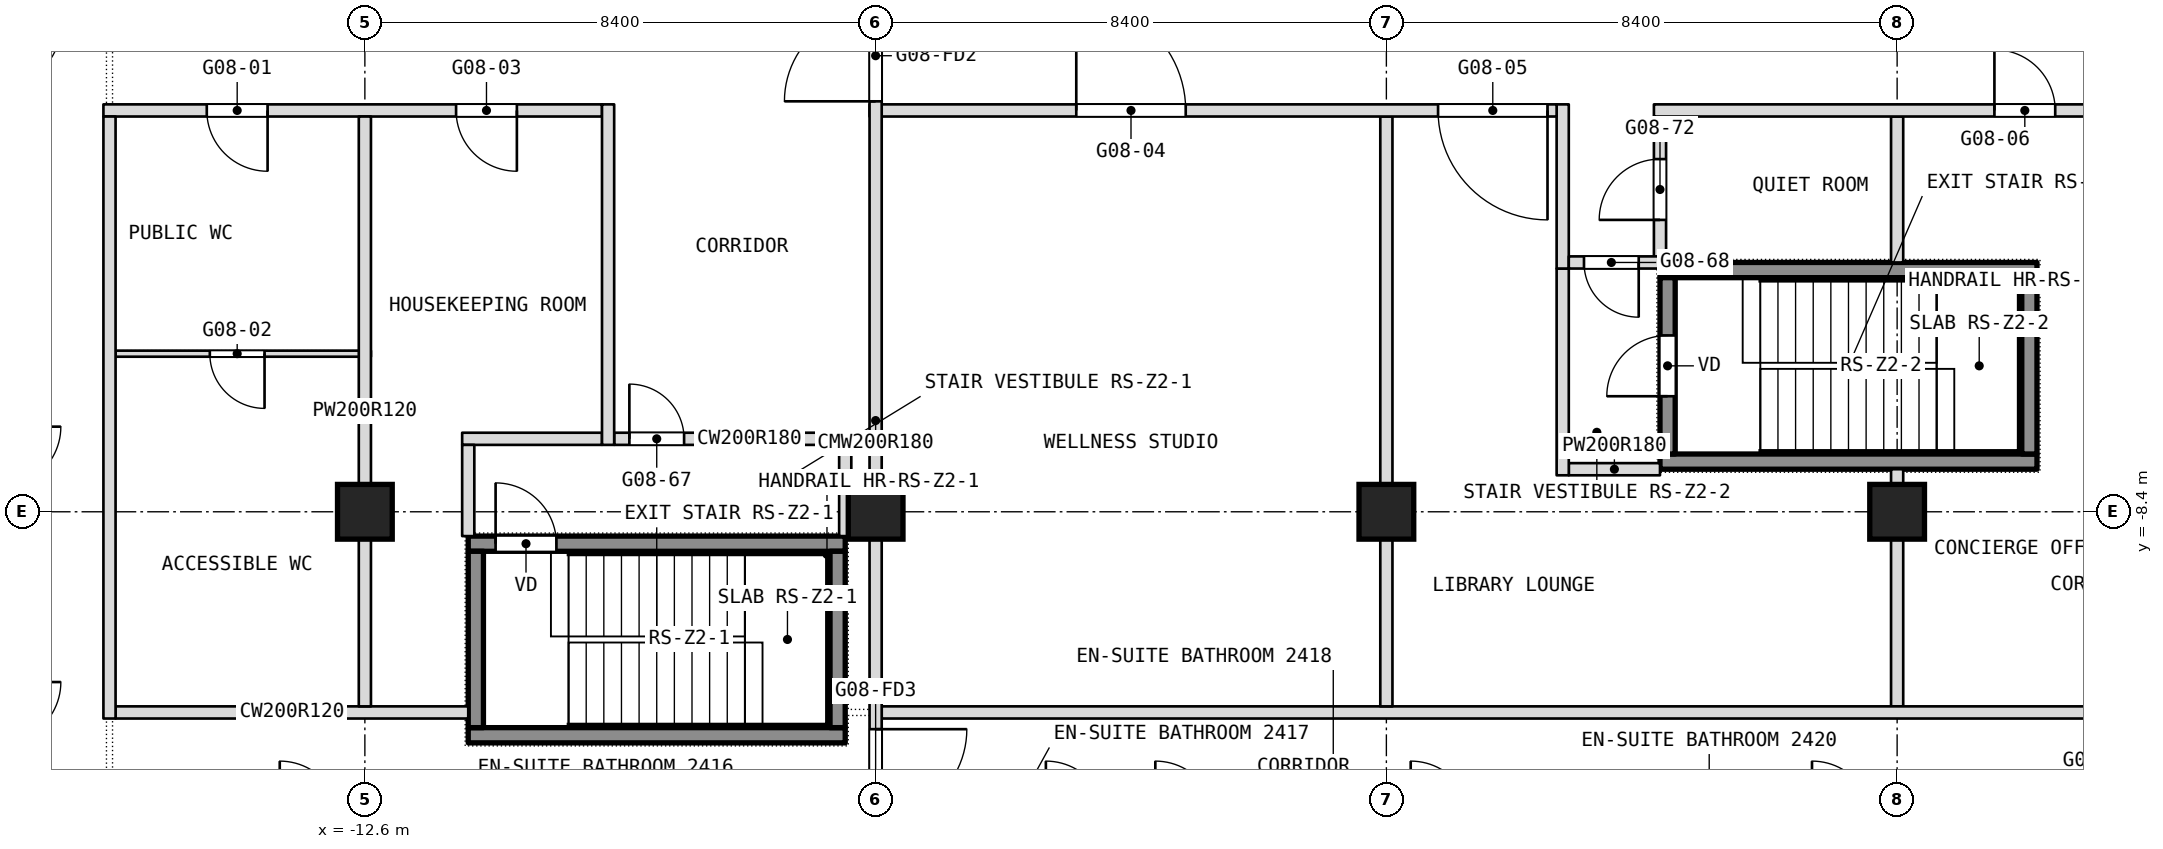
"""IFC4 building model, lengths in metres.
Left out: names, types, materials, properties, quantities, classifications, styles, units other than length and angle.
Written with IfcOpenShell. Run it as: python <this file> out.ifc"""

import sys

from ifc_helpers import new_model, si_unit, direction, frame, frame_2d, origin, origin_2d, place, context, subcontext, project, spatial, rectangle, extrude, element, fill, save


model = new_model("IFC4")
c1 = context("Model", 3, precision=1e-05, world=origin(), true_north=direction((0.0, 1.0)))
c2 = subcontext(c1, "Body", "Model", "MODEL_VIEW")
j1 = project(units=[si_unit("LENGTHUNIT", "METRE"), si_unit("PLANEANGLEUNIT", "RADIAN")], contexts=[c1])
p1 = place(None, origin())
s1 = spatial("IfcSite", under=j1, at=p1, CompositionType="ELEMENT")
p2 = place(p1, origin())
s2 = spatial("IfcBuilding", under=s1, at=p2, CompositionType="ELEMENT")
p3 = place(p2, frame((0.0, 0.0, 112.1)))
s3 = spatial("IfcBuildingStorey", under=s2, at=p3, CompositionType="ELEMENT", Elevation=112.1)
for number, where, z_axis, x_axis in (
    (1, (-12.6, -8.4, 0.0), (0.0, 0.0, 1.0), (1.0, 0.0, 0.0)),
    (2, (-4.2, -8.4, 0.0), (0.0, 0.0, 1.0), (1.0, 0.0, 0.0)),
    (3, (4.2, -8.4, 0.0), (0.0, 0.0, 1.0), (1.0, 0.0, 0.0)),
    (4, (12.6, -8.4, 0.0), (0.0, 0.0, 1.0), (1.0, 0.0, 0.0)),
):
    element("IfcColumn", number, at=place(p3, frame(where, z_axis=z_axis, x_axis=x_axis)), inside=s3, PredefinedType="COLUMN", context=c2, shape_type="SweptSolid", body=[
        extrude(rectangle(XDim=0.9, YDim=0.9, at=origin_2d()), origin(), (0.0, 0.0, 1.0), 3.6),
    ])
p4 = place(p3, frame((12.6, -11.6, 0.0), z_axis=(0.0, 0.0, 1.0), x_axis=(0.0, 1.0, 0.0)))
e5 = element("IfcWall", 5, at=p4, inside=s3, PredefinedType="PARTITIONING", context=c2, shape_type="SweptSolid", body=[
    extrude(rectangle(XDim=3.9, YDim=0.2, at=frame_2d((1.95, 0.0))), origin(), (0.0, 0.0, 1.0), 3.34),
])
p5 = place(p3, frame((12.6, -4.3, 0.0), z_axis=(0.0, 0.0, 1.0), x_axis=(0.0, 1.0, 0.0)))
e6 = element("IfcWall", 6, at=p5, inside=s3, PredefinedType="PARTITIONING", context=c2, shape_type="SweptSolid", body=[
    extrude(rectangle(XDim=2.4, YDim=0.2, at=frame_2d((1.2, 0.0))), origin(), (0.0, 0.0, 1.0), 3.34),
])
p6 = place(p3, frame((-16.7, -11.7, 0.0), z_axis=(0.0, 0.0, 1.0), x_axis=(1.0, 0.0, 0.0)))
e7 = element("IfcWall", 7, at=p6, inside=s3, PredefinedType="PARTITIONING", context=c2, shape_type="SweptSolid", body=[
    extrude(rectangle(XDim=5.8, YDim=0.2, at=frame_2d((2.9, 0.0))), origin(), (0.0, 0.0, 1.0), 3.34),
])
p7 = place(p3, frame((-4.1, -11.7, 0.0), z_axis=(0.0, 0.0, 1.0), x_axis=(1.0, 0.0, 0.0)))
e8 = element("IfcWall", 8, at=p7, inside=s3, PredefinedType="PARTITIONING", context=c2, shape_type="SweptSolid", body=[
    extrude(rectangle(XDim=20.8, YDim=0.2, at=frame_2d((10.4, 0.0))), origin(), (0.0, 0.0, 1.0), 3.34),
])
p8 = place(p3, frame((8.7, -4.3, 0.0), z_axis=(0.0, 0.0, 1.0), x_axis=(0.0, 1.0, 0.0)))
e9 = element("IfcWall", 9, at=p8, inside=s3, PredefinedType="PARTITIONING", context=c2, shape_type="SweptSolid", body=[
    extrude(rectangle(XDim=2.4, YDim=0.2, at=frame_2d((1.2, 0.0))), origin(), (0.0, 0.0, 1.0), 3.34),
])
p9 = place(p8, frame((0.7, 0.0, 0.0)))
e10 = element("IfcOpeningElement", 10, at=p9, cuts=e9, PredefinedType="OPENING", context=c2, shape_type="SweptSolid", body=[
    extrude(rectangle(XDim=1.0, YDim=2.1, at=frame_2d((0.5, 1.05))), frame((0.0, 0.1, 0.0), z_axis=(0.0, -1.0, 0.0), x_axis=(1.0, 0.0, 0.0)), (0.0, 0.0, 1.0), 0.2),
])
p10 = place(p3, frame((7.2, -7.7, 0.0), z_axis=(0.0, 0.0, 1.0), x_axis=(1.0, 0.0, 0.0)))
e11 = element("IfcWall", 11, at=p10, inside=s3, PredefinedType="PARTITIONING", context=c2, shape_type="SweptSolid", body=[
    extrude(rectangle(XDim=1.5, YDim=0.2, at=frame_2d((0.75, 0.0))), origin(), (0.0, 0.0, 1.0), 3.34),
])
p11 = place(p3, frame((-11.0, -7.2, 0.0), z_axis=(0.0, 0.0, 1.0), x_axis=(1.0, 0.0, 0.0)))
e12 = element("IfcWall", 12, at=p11, inside=s3, PredefinedType="PARTITIONING", context=c2, shape_type="SweptSolid", body=[
    extrude(rectangle(XDim=2.3, YDim=0.2, at=frame_2d((1.15, 0.0))), origin(), (0.0, 0.0, 1.0), 3.34),
])
p12 = place(p3, frame((-8.5, -7.2, 0.0), z_axis=(0.0, 0.0, 1.0), x_axis=(1.0, 0.0, 0.0)))
e13 = element("IfcWall", 13, at=p12, inside=s3, PredefinedType="PARTITIONING", context=c2, shape_type="SweptSolid", body=[
    extrude(rectangle(XDim=3.7, YDim=0.2, at=frame_2d((1.85, 0.0))), origin(), (0.0, 0.0, 1.0), 3.34),
])
p13 = place(p12, frame((0.25, 0.0, 0.0)))
e14 = element("IfcOpeningElement", 14, at=p13, cuts=e13, PredefinedType="OPENING", context=c2, shape_type="SweptSolid", body=[
    extrude(rectangle(XDim=0.9, YDim=2.1, at=frame_2d((0.45, 1.05))), frame((0.0, 0.1, 0.0), z_axis=(0.0, -1.0, 0.0), x_axis=(1.0, 0.0, 0.0)), (0.0, 0.0, 1.0), 0.2),
])
p14 = place(p3, frame((7.1, -7.8, 0.0), z_axis=(0.0, 0.0, 1.0), x_axis=(0.0, 1.0, 0.0)))
e15 = element("IfcWall", 15, at=p14, inside=s3, PredefinedType="PARTITIONING", context=c2, shape_type="SweptSolid", body=[
    extrude(rectangle(XDim=3.4, YDim=0.2, at=frame_2d((1.7, 0.0))), origin(), (0.0, 0.0, 1.0), 3.34),
])
p15 = place(p3, frame((7.1, -4.4, 0.0), z_axis=(0.0, 0.0, 1.0), x_axis=(0.0, 1.0, 0.0)))
e16 = element("IfcWall", 16, at=p15, inside=s3, PredefinedType="PARTITIONING", context=c2, shape_type="SweptSolid", body=[
    extrude(rectangle(XDim=2.7, YDim=0.2, at=frame_2d((1.35, 0.0))), origin(), (0.0, 0.0, 1.0), 3.34),
])
p16 = place(p3, frame((-16.7, -5.8, 0.0), z_axis=(0.0, 0.0, 1.0), x_axis=(1.0, 0.0, 0.0)))
e17 = element("IfcWall", 17, at=p16, inside=s3, PredefinedType="PARTITIONING", context=c2, shape_type="SweptSolid", body=[
    extrude(rectangle(XDim=4.2, YDim=0.1, at=frame_2d((2.1, 0.0))), origin(), (0.0, 0.0, 1.0), 3.34),
])
p17 = place(p16, frame((1.55, 0.0, 0.0)))
e18 = element("IfcOpeningElement", 18, at=p17, cuts=e17, PredefinedType="OPENING", context=c2, shape_type="SweptSolid", body=[
    extrude(rectangle(XDim=0.9, YDim=2.1, at=frame_2d((0.45, 1.05))), frame((0.0, 0.05, 0.0), z_axis=(0.0, -1.0, 0.0), x_axis=(1.0, 0.0, 0.0)), (0.0, 0.0, 1.0), 0.1),
])
p18 = place(p3, frame((7.2, -4.3, 0.0), z_axis=(0.0, 0.0, 1.0), x_axis=(1.0, 0.0, 0.0)))
e19 = element("IfcWall", 19, at=p18, inside=s3, PredefinedType="PARTITIONING", context=c2, shape_type="SweptSolid", body=[
    extrude(rectangle(XDim=1.5, YDim=0.2, at=frame_2d((0.75, 0.0))), origin(), (0.0, 0.0, 1.0), 3.34),
])
p19 = place(p18, frame((0.25, 0.0, 0.0)))
e20 = element("IfcOpeningElement", 20, at=p19, cuts=e19, PredefinedType="OPENING", context=c2, shape_type="SweptSolid", body=[
    extrude(rectangle(XDim=0.9, YDim=2.1, at=frame_2d((0.45, 1.05))), frame((0.0, 0.1, 0.0), z_axis=(0.0, -1.0, 0.0), x_axis=(1.0, 0.0, 0.0)), (0.0, 0.0, 1.0), 0.2),
])
p20 = place(p3, frame((4.2, -11.6, 0.0), z_axis=(0.0, 0.0, 1.0), x_axis=(0.0, 1.0, 0.0)))
e21 = element("IfcWall", 21, at=p20, inside=s3, PredefinedType="PARTITIONING", context=c2, shape_type="SweptSolid", body=[
    extrude(rectangle(XDim=9.7, YDim=0.2, at=frame_2d((4.85, 0.0))), origin(), (0.0, 0.0, 1.0), 3.34),
])
p21 = place(p3, frame((-16.9, -1.8, 0.0), z_axis=(0.0, 0.0, 1.0), x_axis=(1.0, 0.0, 0.0)))
e22 = element("IfcWall", 22, at=p21, inside=s3, PredefinedType="PARTITIONING", context=c2, shape_type="SweptSolid", body=[
    extrude(rectangle(XDim=8.2, YDim=0.2, at=frame_2d((4.1, 0.0))), origin(), (0.0, 0.0, 1.0), 3.34),
])
p22 = place(p21, frame((1.7, 0.0, 0.0)))
e23 = element("IfcOpeningElement", 23, at=p22, cuts=e22, PredefinedType="OPENING", context=c2, shape_type="SweptSolid", body=[
    extrude(rectangle(XDim=1.0, YDim=2.1, at=frame_2d((0.5, 1.05))), frame((0.0, 0.1, 0.0), z_axis=(0.0, -1.0, 0.0), x_axis=(1.0, 0.0, 0.0)), (0.0, 0.0, 1.0), 0.2),
])
p23 = place(p21, frame((5.8, 0.0, 0.0)))
e24 = element("IfcOpeningElement", 24, at=p23, cuts=e22, PredefinedType="OPENING", context=c2, shape_type="SweptSolid", body=[
    extrude(rectangle(XDim=1.0, YDim=2.1, at=frame_2d((0.5, 1.05))), frame((0.0, 0.1, 0.0), z_axis=(0.0, -1.0, 0.0), x_axis=(1.0, 0.0, 0.0)), (0.0, 0.0, 1.0), 0.2),
])
p24 = place(p3, frame((-4.3, -1.8, 0.0), z_axis=(0.0, 0.0, 1.0), x_axis=(1.0, 0.0, 0.0)))
e25 = element("IfcWall", 25, at=p24, inside=s3, PredefinedType="PARTITIONING", context=c2, shape_type="SweptSolid", body=[
    extrude(rectangle(XDim=11.3, YDim=0.2, at=frame_2d((5.65, 0.0))), origin(), (0.0, 0.0, 1.0), 3.34),
])
p25 = place(p24, frame((3.4, 0.0, 0.0)))
e26 = element("IfcOpeningElement", 26, at=p25, cuts=e25, PredefinedType="OPENING", context=c2, shape_type="SweptSolid", body=[
    extrude(rectangle(XDim=1.8, YDim=2.1, at=frame_2d((0.9, 1.05))), frame((0.0, 0.1, 0.0), z_axis=(0.0, -1.0, 0.0), x_axis=(1.0, 0.0, 0.0)), (0.0, 0.0, 1.0), 0.2),
])
p26 = place(p24, frame((9.35, 0.0, 0.0)))
e27 = element("IfcOpeningElement", 27, at=p26, cuts=e25, PredefinedType="OPENING", context=c2, shape_type="SweptSolid", body=[
    extrude(rectangle(XDim=1.8, YDim=2.1, at=frame_2d((0.9, 1.05))), frame((0.0, 0.1, 0.0), z_axis=(0.0, -1.0, 0.0), x_axis=(1.0, 0.0, 0.0)), (0.0, 0.0, 1.0), 0.2),
])
p27 = place(p3, frame((8.6, -1.8, 0.0), z_axis=(0.0, 0.0, 1.0), x_axis=(1.0, 0.0, 0.0)))
e28 = element("IfcWall", 28, at=p27, inside=s3, PredefinedType="PARTITIONING", context=c2, shape_type="SweptSolid", body=[
    extrude(rectangle(XDim=8.3, YDim=0.2, at=frame_2d((4.15, 0.0))), origin(), (0.0, 0.0, 1.0), 3.34),
])
p28 = place(p27, frame((5.6, 0.0, 0.0)))
e29 = element("IfcOpeningElement", 29, at=p28, cuts=e28, PredefinedType="OPENING", context=c2, shape_type="SweptSolid", body=[
    extrude(rectangle(XDim=1.0, YDim=2.1, at=frame_2d((0.5, 1.05))), frame((0.0, 0.1, 0.0), z_axis=(0.0, -1.0, 0.0), x_axis=(1.0, 0.0, 0.0)), (0.0, 0.0, 1.0), 0.2),
])
p29 = place(p3, frame((-4.2, -13.8, 0.0), z_axis=(0.0, 0.0, 1.0), x_axis=(0.0, 1.0, 0.0)))
e30 = element("IfcWall", 30, at=p29, inside=s3, PredefinedType="PARTITIONING", context=c2, shape_type="SweptSolid", body=[
    extrude(rectangle(XDim=13.8, YDim=0.2, at=frame_2d((6.9, 0.0))), origin(), (0.0, 0.0, 1.0), 3.34),
])
p30 = place(p29, frame((12.15, 0.0, 0.0)))
e31 = element("IfcOpeningElement", 31, at=p30, cuts=e30, PredefinedType="OPENING", context=c2, shape_type="SweptSolid", body=[
    extrude(rectangle(XDim=1.5, YDim=2.1, at=frame_2d((0.75, 1.05))), frame((0.0, 0.1, 0.0), z_axis=(0.0, -1.0, 0.0), x_axis=(1.0, 0.0, 0.0)), (0.0, 0.0, 1.0), 0.2),
])
p31 = place(p29, frame((0.325, 0.0, 0.0)))
e32 = element("IfcOpeningElement", 32, at=p31, cuts=e30, PredefinedType="OPENING", context=c2, shape_type="SweptSolid", body=[
    extrude(rectangle(XDim=1.5, YDim=2.1, at=frame_2d((0.75, 1.05))), frame((0.0, 0.1, 0.0), z_axis=(0.0, -1.0, 0.0), x_axis=(1.0, 0.0, 0.0)), (0.0, 0.0, 1.0), 0.2),
])
p32 = place(p3, frame((-4.7, -8.8, 0.0), z_axis=(0.0, 0.0, 1.0), x_axis=(0.0, 1.0, 0.0)))
e33 = element("IfcWall", 33, at=p32, inside=s3, PredefinedType="PARTITIONING", context=c2, shape_type="SweptSolid", body=[
    extrude(rectangle(XDim=1.7, YDim=0.2, at=frame_2d((0.85, 0.0))), origin(), (0.0, 0.0, 1.0), 3.34),
])
p33 = place(p3, frame((-8.6, -7.3, 0.0), z_axis=(0.0, 0.0, 1.0), x_axis=(0.0, 1.0, 0.0)))
e34 = element("IfcWall", 34, at=p33, inside=s3, PredefinedType="PARTITIONING", context=c2, shape_type="SweptSolid", body=[
    extrude(rectangle(XDim=5.6, YDim=0.2, at=frame_2d((2.8, 0.0))), origin(), (0.0, 0.0, 1.0), 3.34),
])
p34 = place(p3, frame((-10.9, -8.8, 0.0), z_axis=(0.0, 0.0, 1.0), x_axis=(0.0, 1.0, 0.0)))
e35 = element("IfcWall", 35, at=p34, inside=s3, PredefinedType="PARTITIONING", context=c2, shape_type="SweptSolid", body=[
    extrude(rectangle(XDim=1.5, YDim=0.2, at=frame_2d((0.75, 0.0))), origin(), (0.0, 0.0, 1.0), 3.34),
])
p35 = place(p3, frame((-12.6, -11.6, 0.0), z_axis=(0.0, 0.0, 1.0), x_axis=(0.0, 1.0, 0.0)))
e36 = element("IfcWall", 36, at=p35, inside=s3, PredefinedType="PARTITIONING", context=c2, shape_type="SweptSolid", body=[
    extrude(rectangle(XDim=9.7, YDim=0.2, at=frame_2d((4.85, 0.0))), origin(), (0.0, 0.0, 1.0), 3.34),
])
p36 = place(p3, frame((-16.8, -11.8, 0.0), z_axis=(0.0, 0.0, 1.0), x_axis=(0.0, 1.0, 0.0)))
e37 = element("IfcWall", 37, at=p36, inside=s3, PredefinedType="PARTITIONING", context=c2, shape_type="SweptSolid", body=[
    extrude(rectangle(XDim=9.9, YDim=0.2, at=frame_2d((4.95, 0.0))), origin(), (0.0, 0.0, 1.0), 3.34),
])
p37 = place(p3, frame((-10.9, -12.075, 0.1), z_axis=(0.0, 0.0, 1.0), x_axis=(1.0, 0.0, 0.0)))
e38 = element("IfcWall", 38, at=p37, inside=s3, PredefinedType="SHEAR", context=c2, shape_type="SweptSolid", body=[
    extrude(rectangle(XDim=6.2, YDim=0.25, at=frame_2d((3.1, 0.0))), origin(), (0.0, 0.0, 1.0), 3.6),
])
p38 = place(p3, frame((-10.9, -8.925, 0.1), z_axis=(0.0, 0.0, 1.0), x_axis=(1.0, 0.0, 0.0)))
e39 = element("IfcWall", 39, at=p38, inside=s3, PredefinedType="SHEAR", context=c2, shape_type="SweptSolid", body=[
    extrude(rectangle(XDim=6.2, YDim=0.25, at=frame_2d((3.1, 0.0))), origin(), (0.0, 0.0, 1.0), 3.6),
])
p39 = place(p38, frame((0.45, 0.0, 0.0)))
e40 = element("IfcOpeningElement", 40, at=p39, cuts=e39, PredefinedType="OPENING", context=c2, shape_type="SweptSolid", body=[
    extrude(rectangle(XDim=1.0, YDim=2.1, at=frame_2d((0.5, 1.05))), frame((0.0, 0.125, 0.0), z_axis=(0.0, -1.0, 0.0), x_axis=(1.0, 0.0, 0.0)), (0.0, 0.0, 1.0), 0.25),
])
for number, where, z_axis, x_axis in (
    (41, (-10.775, -11.95, 0.1), (0.0, 0.0, 1.0), (0.0, 1.0, 0.0)),
    (42, (-4.825, -11.95, 0.1), (0.0, 0.0, 1.0), (0.0, 1.0, 0.0)),
):
    element("IfcWall", number, at=place(p3, frame(where, z_axis=z_axis, x_axis=x_axis)), inside=s3, PredefinedType="SHEAR", context=c2, shape_type="SweptSolid", body=[
        extrude(rectangle(XDim=2.9, YDim=0.25, at=frame_2d((1.45, 0.0))), origin(), (0.0, 0.0, 1.0), 3.6),
    ])
for number, where, z_axis, x_axis in (
    (43, (8.7, -7.575, 0.1), (0.0, 0.0, 1.0), (1.0, 0.0, 0.0)),
    (44, (8.7, -4.425, 0.1), (0.0, 0.0, 1.0), (1.0, 0.0, 0.0)),
):
    element("IfcWall", number, at=place(p3, frame(where, z_axis=z_axis, x_axis=x_axis)), inside=s3, PredefinedType="SHEAR", context=c2, shape_type="SweptSolid", body=[
        extrude(rectangle(XDim=6.2, YDim=0.25, at=frame_2d((3.1, 0.0))), origin(), (0.0, 0.0, 1.0), 3.6),
    ])
p40 = place(p3, frame((8.825, -7.45, 0.1), z_axis=(0.0, 0.0, 1.0), x_axis=(0.0, 1.0, 0.0)))
e45 = element("IfcWall", 45, at=p40, inside=s3, PredefinedType="SHEAR", context=c2, shape_type="SweptSolid", body=[
    extrude(rectangle(XDim=2.9, YDim=0.25, at=frame_2d((1.45, 0.0))), origin(), (0.0, 0.0, 1.0), 3.6),
])
p41 = place(p40, frame((0.95, 0.0, 0.0)))
e46 = element("IfcOpeningElement", 46, at=p41, cuts=e45, PredefinedType="OPENING", context=c2, shape_type="SweptSolid", body=[
    extrude(rectangle(XDim=1.0, YDim=2.1, at=frame_2d((0.5, 1.05))), frame((0.0, 0.125, 0.0), z_axis=(0.0, -1.0, 0.0), x_axis=(1.0, 0.0, 0.0)), (0.0, 0.0, 1.0), 0.25),
])
p42 = place(p3, frame((14.775, -7.45, 0.1), z_axis=(0.0, 0.0, 1.0), x_axis=(0.0, 1.0, 0.0)))
e47 = element("IfcWall", 47, at=p42, inside=s3, PredefinedType="SHEAR", context=c2, shape_type="SweptSolid", body=[
    extrude(rectangle(XDim=2.9, YDim=0.25, at=frame_2d((1.45, 0.0))), origin(), (0.0, 0.0, 1.0), 3.6),
])
p43 = place(p9, origin())
e48 = element("IfcDoor", 48, at=p43, inside=s3, OperationType="SINGLE_SWING_LEFT", PredefinedType="DOOR", context=c2, shape_type="SweptSolid", body=[
    extrude(rectangle(XDim=1.0, YDim=2.1, at=frame_2d((0.5, 1.05))), frame((0.0, 0.025, 0.0), z_axis=(0.0, -1.0, 0.0), x_axis=(1.0, 0.0, 0.0)), (0.0, 0.0, 1.0), 0.05),
])
fill(e10, e48)
p44 = place(p13, origin())
e49 = element("IfcDoor", 49, at=p44, inside=s3, OperationType="SINGLE_SWING_RIGHT", PredefinedType="DOOR", context=c2, shape_type="SweptSolid", body=[
    extrude(rectangle(XDim=0.9, YDim=2.1, at=frame_2d((0.45, 1.05))), frame((0.0, 0.025, 0.0), z_axis=(0.0, -1.0, 0.0), x_axis=(1.0, 0.0, 0.0)), (0.0, 0.0, 1.0), 0.05),
])
fill(e14, e49)
p45 = place(p17, origin())
e50 = element("IfcDoor", 50, at=p45, inside=s3, OperationType="SINGLE_SWING_RIGHT", PredefinedType="DOOR", context=c2, shape_type="SweptSolid", body=[
    extrude(rectangle(XDim=0.9, YDim=2.1, at=frame_2d((0.45, 1.05))), frame((0.0, 0.025, 0.0), z_axis=(0.0, -1.0, 0.0), x_axis=(1.0, 0.0, 0.0)), (0.0, 0.0, 1.0), 0.05),
])
fill(e18, e50)
p46 = place(p19, origin())
e51 = element("IfcDoor", 51, at=p46, inside=s3, OperationType="SINGLE_SWING_RIGHT", PredefinedType="DOOR", context=c2, shape_type="SweptSolid", body=[
    extrude(rectangle(XDim=0.9, YDim=2.1, at=frame_2d((0.45, 1.05))), frame((0.0, 0.025, 0.0), z_axis=(0.0, -1.0, 0.0), x_axis=(1.0, 0.0, 0.0)), (0.0, 0.0, 1.0), 0.05),
])
fill(e20, e51)
p47 = place(p22, origin())
e52 = element("IfcDoor", 52, at=p47, inside=s3, OperationType="SINGLE_SWING_LEFT", PredefinedType="DOOR", context=c2, shape_type="SweptSolid", body=[
    extrude(rectangle(XDim=1.0, YDim=2.1, at=frame_2d((0.5, 1.05))), frame((0.0, 0.025, 0.0), z_axis=(0.0, -1.0, 0.0), x_axis=(1.0, 0.0, 0.0)), (0.0, 0.0, 1.0), 0.05),
])
fill(e23, e52)
p48 = place(p23, origin())
e53 = element("IfcDoor", 53, at=p48, inside=s3, OperationType="SINGLE_SWING_LEFT", PredefinedType="DOOR", context=c2, shape_type="SweptSolid", body=[
    extrude(rectangle(XDim=1.0, YDim=2.1, at=frame_2d((0.5, 1.05))), frame((0.0, 0.025, 0.0), z_axis=(0.0, -1.0, 0.0), x_axis=(1.0, 0.0, 0.0)), (0.0, 0.0, 1.0), 0.05),
])
fill(e24, e53)
p49 = place(p25, origin())
e54 = element("IfcDoor", 54, at=p49, inside=s3, OperationType="DOUBLE_DOOR_SINGLE_SWING", PredefinedType="DOOR", context=c2, shape_type="SweptSolid", body=[
    extrude(rectangle(XDim=1.8, YDim=2.1, at=frame_2d((0.9, 1.05))), frame((0.0, 0.025, 0.0), z_axis=(0.0, -1.0, 0.0), x_axis=(1.0, 0.0, 0.0)), (0.0, 0.0, 1.0), 0.05),
])
fill(e26, e54)
p50 = place(p26, origin())
e55 = element("IfcDoor", 55, at=p50, inside=s3, OperationType="DOUBLE_DOOR_SINGLE_SWING", PredefinedType="DOOR", context=c2, shape_type="SweptSolid", body=[
    extrude(rectangle(XDim=1.8, YDim=2.1, at=frame_2d((0.9, 1.05))), frame((0.0, 0.025, 0.0), z_axis=(0.0, -1.0, 0.0), x_axis=(1.0, 0.0, 0.0)), (0.0, 0.0, 1.0), 0.05),
])
fill(e27, e55)
p51 = place(p28, origin())
e56 = element("IfcDoor", 56, at=p51, inside=s3, OperationType="SINGLE_SWING_RIGHT", PredefinedType="DOOR", context=c2, shape_type="SweptSolid", body=[
    extrude(rectangle(XDim=1.0, YDim=2.1, at=frame_2d((0.5, 1.05))), frame((0.0, 0.025, 0.0), z_axis=(0.0, -1.0, 0.0), x_axis=(1.0, 0.0, 0.0)), (0.0, 0.0, 1.0), 0.05),
])
fill(e29, e56)
p52 = place(p39, origin())
e57 = element("IfcDoor", 57, at=p52, inside=s3, OperationType="SINGLE_SWING_LEFT", PredefinedType="DOOR", context=c2, shape_type="SweptSolid", body=[
    extrude(rectangle(XDim=1.0, YDim=2.1, at=frame_2d((0.5, 1.05))), frame((0.0, 0.025, 0.0), z_axis=(0.0, -1.0, 0.0), x_axis=(1.0, 0.0, 0.0)), (0.0, 0.0, 1.0), 0.05),
])
fill(e40, e57)
p53 = place(p41, origin())
e58 = element("IfcDoor", 58, at=p53, inside=s3, OperationType="SINGLE_SWING_LEFT", PredefinedType="DOOR", context=c2, shape_type="SweptSolid", body=[
    extrude(rectangle(XDim=1.0, YDim=2.1, at=frame_2d((0.5, 1.05))), frame((0.0, 0.025, 0.0), z_axis=(0.0, -1.0, 0.0), x_axis=(1.0, 0.0, 0.0)), (0.0, 0.0, 1.0), 0.05),
])
fill(e46, e58)
p54 = place(p30, origin())
e59 = element("IfcDoor", 59, at=p54, inside=s3, OperationType="DOUBLE_DOOR_DOUBLE_SWING", PredefinedType="DOOR", context=c2, shape_type="SweptSolid", body=[
    extrude(rectangle(XDim=1.5, YDim=2.1, at=frame_2d((0.75, 1.05))), frame((0.0, 0.025, 0.0), z_axis=(0.0, -1.0, 0.0), x_axis=(1.0, 0.0, 0.0)), (0.0, 0.0, 1.0), 0.05),
])
fill(e31, e59)
p55 = place(p31, origin())
e60 = element("IfcDoor", 60, at=p55, inside=s3, OperationType="DOUBLE_DOOR_DOUBLE_SWING", PredefinedType="DOOR", context=c2, shape_type="SweptSolid", body=[
    extrude(rectangle(XDim=1.5, YDim=2.1, at=frame_2d((0.75, 1.05))), frame((0.0, 0.025, 0.0), z_axis=(0.0, -1.0, 0.0), x_axis=(1.0, 0.0, 0.0)), (0.0, 0.0, 1.0), 0.05),
])
fill(e32, e60)
save(model, sys.argv[1])
